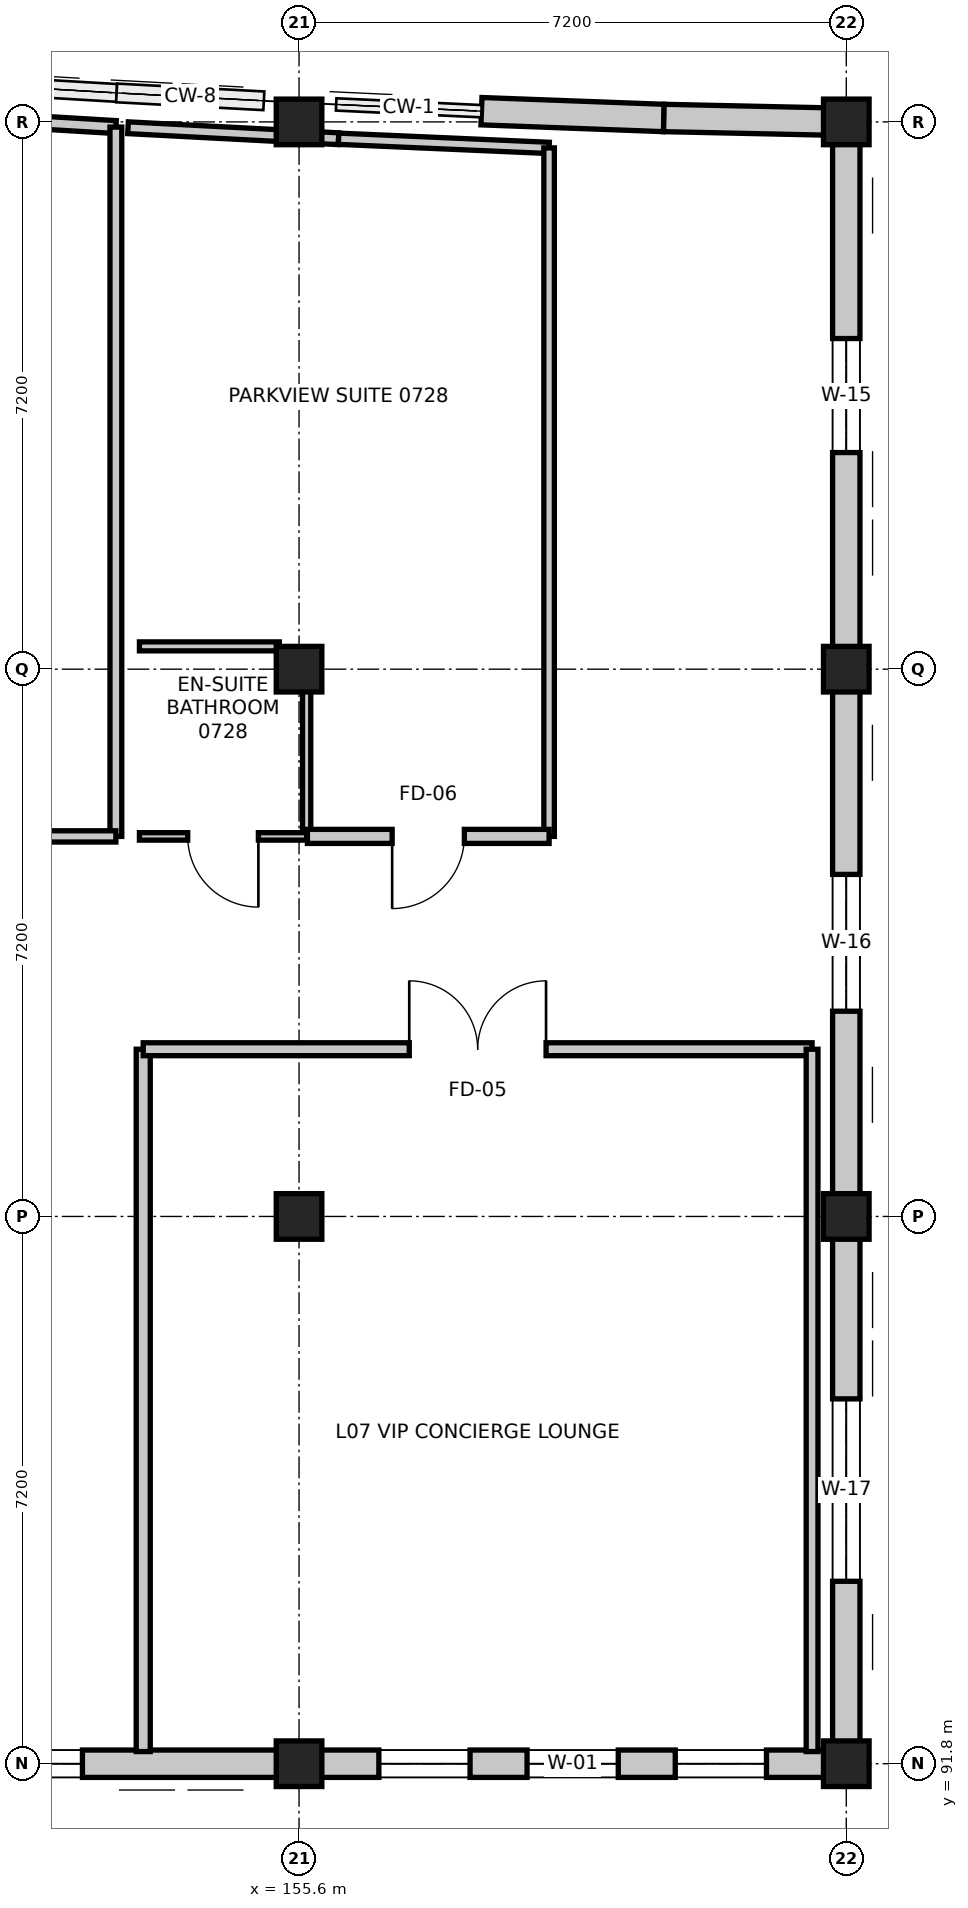
"""IFC4 building model, lengths in metres.
Left out: names, types, materials, properties, quantities, classifications, styles, units other than length and angle.
Written with IfcOpenShell. Run it as: python <this file> out.ifc"""

import sys

from ifc_helpers import new_model, si_unit, direction, frame, frame_2d, origin, origin_2d, place, context, subcontext, project, spatial, rectangle, extrude, element, fill, save


model = new_model("IFC4")
c1 = context("Model", 3, precision=1e-05, world=origin(), true_north=direction((0.0, 1.0)))
c2 = subcontext(c1, "Body", "Model", "MODEL_VIEW")
j1 = project(units=[si_unit("LENGTHUNIT", "METRE"), si_unit("PLANEANGLEUNIT", "RADIAN")], contexts=[c1])
p1 = place(None, origin())
s1 = spatial("IfcSite", under=j1, at=p1, CompositionType="ELEMENT")
p2 = place(p1, origin())
s2 = spatial("IfcBuilding", under=s1, at=p2, CompositionType="ELEMENT")
p3 = place(p2, frame((0.0, 0.0, 30.0)))
s3 = spatial("IfcBuildingStorey", under=s2, at=p3, CompositionType="ELEMENT", Elevation=30.0)
for number, where, z_axis, x_axis in (
    (1, (155.6, 91.8, 0.0), (0.0, 0.0, 1.0), (1.0, 0.0, 0.0)),
    (2, (155.6, 99.0, 0.0), (0.0, 0.0, 1.0), (1.0, 0.0, 0.0)),
    (3, (155.6, 106.2, 0.0), (0.0, 0.0, 1.0), (1.0, 0.0, 0.0)),
    (4, (155.6, 113.4, 0.0), (0.0, 0.0, 1.0), (1.0, 0.0, 0.0)),
    (5, (162.8, 91.8, 0.0), (0.0, 0.0, 1.0), (1.0, 0.0, 0.0)),
    (6, (162.8, 99.0, 0.0), (0.0, 0.0, 1.0), (1.0, 0.0, 0.0)),
    (7, (162.8, 106.2, 0.0), (0.0, 0.0, 1.0), (1.0, 0.0, 0.0)),
    (8, (162.8, 113.4, 0.0), (0.0, 0.0, 1.0), (1.0, 0.0, 0.0)),
):
    element("IfcColumn", number, at=place(p3, frame(where, z_axis=z_axis, x_axis=x_axis)), inside=s3, PredefinedType="COLUMN", context=c2, shape_type="SweptSolid", body=[
        extrude(rectangle(XDim=0.6, YDim=0.6, at=origin_2d()), origin(), (0.0, 0.0, 1.0), 3.6),
    ])
p4 = place(p3, frame((158.0, 113.541, 0.0), z_axis=(0.0, 0.0, 1.0), x_axis=(0.99930757318, -0.037207179225, 0.0)))
e9 = element("IfcWall", 9, at=p4, inside=s3, PredefinedType="STANDARD", context=c2, shape_type="SweptSolid", body=[
    extrude(rectangle(XDim=2.402, YDim=0.36, at=frame_2d((1.201, 0.0))), origin(), (0.0, 0.0, 1.0), 2.86),
])
p5 = place(p3, frame((160.4, 113.452, 0.0), z_axis=(0.0, 0.0, 1.0), x_axis=(0.999767568547, -0.021559426766, 0.0)))
e10 = element("IfcWall", 10, at=p5, inside=s3, PredefinedType="STANDARD", context=c2, shape_type="SweptSolid", body=[
    extrude(rectangle(XDim=2.401, YDim=0.36, at=frame_2d((1.2, 0.0))), origin(), (0.0, 0.0, 1.0), 2.86),
])
p6 = place(p3, frame((162.8, 113.4, 0.0), z_axis=(0.0, 0.0, 1.0), x_axis=(0.0, -1.0, 0.0)))
e11 = element("IfcWall", 11, at=p6, inside=s3, PredefinedType="STANDARD", context=c2, shape_type="SweptSolid", body=[
    extrude(rectangle(XDim=7.2, YDim=0.36, at=frame_2d((3.6, 0.0))), origin(), (0.0, 0.0, 1.0), 2.695),
])
p7 = place(p6, frame((2.85, 0.0, 0.75)))
e12 = element("IfcOpeningElement", 12, at=p7, cuts=e11, PredefinedType="OPENING", context=c2, shape_type="SweptSolid", body=[
    extrude(rectangle(XDim=1.5, YDim=1.5, at=frame_2d((0.75, 0.75))), frame((0.0, 0.19, 0.0), z_axis=(0.0, -1.0, 0.0), x_axis=(1.0, 0.0, 0.0)), (0.0, 0.0, 1.0), 0.38),
])
p8 = place(p3, frame((162.8, 106.2, 0.0), z_axis=(0.0, 0.0, 1.0), x_axis=(0.0, -1.0, 0.0)))
e13 = element("IfcWall", 13, at=p8, inside=s3, PredefinedType="STANDARD", context=c2, shape_type="SweptSolid", body=[
    extrude(rectangle(XDim=7.2, YDim=0.36, at=frame_2d((3.6, 0.0))), origin(), (0.0, 0.0, 1.0), 2.695),
])
p9 = place(p8, frame((2.7, 0.0, 0.75)))
e14 = element("IfcOpeningElement", 14, at=p9, cuts=e13, PredefinedType="OPENING", context=c2, shape_type="SweptSolid", body=[
    extrude(rectangle(XDim=1.8, YDim=1.5, at=frame_2d((0.9, 0.75))), frame((0.0, 0.19, 0.0), z_axis=(0.0, -1.0, 0.0), x_axis=(1.0, 0.0, 0.0)), (0.0, 0.0, 1.0), 0.38),
])
p10 = place(p3, frame((162.8, 99.0, 0.0), z_axis=(0.0, 0.0, 1.0), x_axis=(0.0, -1.0, 0.0)))
e15 = element("IfcWall", 15, at=p10, inside=s3, PredefinedType="STANDARD", context=c2, shape_type="SweptSolid", body=[
    extrude(rectangle(XDim=7.2, YDim=0.36, at=frame_2d((3.6, 0.0))), origin(), (0.0, 0.0, 1.0), 2.695),
])
p11 = place(p10, frame((2.4, 0.0, 0.75)))
e16 = element("IfcOpeningElement", 16, at=p11, cuts=e15, PredefinedType="OPENING", context=c2, shape_type="SweptSolid", body=[
    extrude(rectangle(XDim=2.4, YDim=1.5, at=frame_2d((1.2, 0.75))), frame((0.0, 0.19, 0.0), z_axis=(0.0, -1.0, 0.0), x_axis=(1.0, 0.0, 0.0)), (0.0, 0.0, 1.0), 0.38),
])
p12 = place(p3, frame((162.8, 91.8, 0.0), z_axis=(0.0, 0.0, 1.0), x_axis=(-1.0, 0.0, 0.0)))
e17 = element("IfcWall", 17, at=p12, inside=s3, PredefinedType="STANDARD", context=c2, shape_type="SweptSolid", body=[
    extrude(rectangle(XDim=7.2, YDim=0.36, at=frame_2d((3.6, 0.0))), origin(), (0.0, 0.0, 1.0), 2.86),
])
p13 = place(p12, frame((3.0, 0.0, 0.75)))
e18 = element("IfcOpeningElement", 18, at=p13, cuts=e17, PredefinedType="OPENING", context=c2, shape_type="SweptSolid", body=[
    extrude(rectangle(XDim=1.2, YDim=1.8, at=frame_2d((0.6, 0.9))), frame((0.0, 0.19, 0.0), z_axis=(0.0, -1.0, 0.0), x_axis=(1.0, 0.0, 0.0)), (0.0, 0.0, 1.0), 0.38),
])
p14 = place(p12, frame((1.05, 0.0, 0.85)))
e19 = element("IfcOpeningElement", 19, at=p14, cuts=e17, PredefinedType="OPENING", context=c2, shape_type="SweptSolid", body=[
    extrude(rectangle(XDim=1.2, YDim=1.8, at=frame_2d((0.6, 0.9))), frame((0.0, 0.19, 0.0), z_axis=(0.0, -1.0, 0.0), x_axis=(1.0, 0.0, 0.0)), (0.0, 0.0, 1.0), 0.38),
])
p15 = place(p12, frame((4.95, 0.0, 0.85)))
e20 = element("IfcOpeningElement", 20, at=p15, cuts=e17, PredefinedType="OPENING", context=c2, shape_type="SweptSolid", body=[
    extrude(rectangle(XDim=1.2, YDim=1.8, at=frame_2d((0.6, 0.9))), frame((0.0, 0.19, 0.0), z_axis=(0.0, -1.0, 0.0), x_axis=(1.0, 0.0, 0.0)), (0.0, 0.0, 1.0), 0.38),
])
p16 = place(p3, frame((155.6, 91.8, 0.0), z_axis=(0.0, 0.0, 1.0), x_axis=(-1.0, 0.0, 0.0)))
e21 = element("IfcWall", 21, at=p16, inside=s3, PredefinedType="STANDARD", context=c2, shape_type="SweptSolid", body=[
    extrude(rectangle(XDim=7.2, YDim=0.36, at=frame_2d((3.6, 0.0))), origin(), (0.0, 0.0, 1.0), 2.745),
])
p17 = place(p16, frame((2.85, 0.0, 0.75)))
e22 = element("IfcOpeningElement", 22, at=p17, cuts=e21, PredefinedType="OPENING", context=c2, shape_type="SweptSolid", body=[
    extrude(rectangle(XDim=1.5, YDim=1.5, at=frame_2d((0.75, 0.75))), frame((0.0, 0.19, 0.0), z_axis=(0.0, -1.0, 0.0), x_axis=(1.0, 0.0, 0.0)), (0.0, 0.0, 1.0), 0.38),
])
p18 = place(p16, frame((4.899, 0.0, 0.85)))
e23 = element("IfcOpeningElement", 23, at=p18, cuts=e21, PredefinedType="OPENING", context=c2, shape_type="SweptSolid", body=[
    extrude(rectangle(XDim=1.2, YDim=1.8, at=frame_2d((0.6, 0.9))), frame((0.0, 0.19, 0.0), z_axis=(0.0, -1.0, 0.0), x_axis=(1.0, 0.0, 0.0)), (0.0, 0.0, 1.0), 0.38),
])
p19 = place(p3, frame((153.55, 91.96, 0.0), z_axis=(0.0, 0.0, 1.0), x_axis=(0.0, 1.0, 0.0)))
e24 = element("IfcWall", 24, at=p19, inside=s3, PredefinedType="PARTITIONING", context=c2, shape_type="SweptSolid", body=[
    extrude(rectangle(XDim=9.24, YDim=0.185, at=frame_2d((4.62, 0.0))), origin(), (0.0, 0.0, 1.0), 2.745),
])
p20 = place(p3, frame((153.55, 101.2, 0.0), z_axis=(0.0, 0.0, 1.0), x_axis=(1.0, 0.0, 0.0)))
e25 = element("IfcWall", 25, at=p20, inside=s3, PredefinedType="PARTITIONING", context=c2, shape_type="SweptSolid", body=[
    extrude(rectangle(XDim=8.8, YDim=0.17, at=frame_2d((4.4, 0.0))), origin(), (0.0, 0.0, 1.0), 2.695),
])
p21 = place(p20, frame((3.5, 0.0, 0.0)))
e26 = element("IfcOpeningElement", 26, at=p21, cuts=e25, PredefinedType="OPENING", context=c2, shape_type="SweptSolid", body=[
    extrude(rectangle(XDim=1.8, YDim=2.2, at=frame_2d((0.9, 1.1))), frame((0.0, 0.095, 0.0), z_axis=(0.0, -1.0, 0.0), x_axis=(1.0, 0.0, 0.0)), (0.0, 0.0, 1.0), 0.19),
])
p22 = place(p3, frame((162.35, 101.2, 0.0), z_axis=(0.0, 0.0, 1.0), x_axis=(0.0, -1.0, 0.0)))
e27 = element("IfcWall", 27, at=p22, inside=s3, PredefinedType="PARTITIONING", context=c2, shape_type="SweptSolid", body=[
    extrude(rectangle(XDim=9.24, YDim=0.155, at=frame_2d((4.62, 0.0))), origin(), (0.0, 0.0, 1.0), 2.86),
])
p23 = place(p3, frame((150.42, 113.497, 0.0), z_axis=(0.0, 0.0, 1.0), x_axis=(0.998224568203, -0.059562668136, 0.0)))
e28 = element("IfcWall", 28, at=p23, inside=s3, PredefinedType="PARTITIONING", context=c2, shape_type="SweptSolid", body=[
    extrude(rectangle(XDim=2.775, YDim=0.17, at=frame_2d((1.387, 0.0))), origin(), (0.0, 0.0, 1.0), 2.745),
])
p24 = place(p3, frame((153.19, 113.332, 0.0), z_axis=(0.0, 0.0, 1.0), x_axis=(0.0, -1.0, 0.0)))
e29 = element("IfcWall", 29, at=p24, inside=s3, PredefinedType="PARTITIONING", context=c2, shape_type="SweptSolid", body=[
    extrude(rectangle(XDim=9.332, YDim=0.155, at=frame_2d((4.666, 0.0))), origin(), (0.0, 0.0, 1.0), 2.745),
])
p25 = place(p3, frame((153.19, 104.0, 0.0), z_axis=(0.0, 0.0, 1.0), x_axis=(-1.0, 0.0, 0.0)))
e30 = element("IfcWall", 30, at=p25, inside=s3, PredefinedType="PARTITIONING", context=c2, shape_type="SweptSolid", body=[
    extrude(rectangle(XDim=3.18, YDim=0.148, at=frame_2d((1.59, 0.0))), origin(), (0.0, 0.0, 1.0), 3.36),
])
p26 = place(p25, frame((1.06, 0.0, 0.0)))
e31 = element("IfcOpeningElement", 31, at=p26, cuts=e30, PredefinedType="OPENING", context=c2, shape_type="SweptSolid", body=[
    extrude(rectangle(XDim=1.06, YDim=2.2, at=frame_2d((0.53, 1.1))), frame((0.0, 0.084, 0.0), z_axis=(0.0, -1.0, 0.0), x_axis=(1.0, 0.0, 0.0)), (0.0, 0.0, 1.0), 0.168),
])
p27 = place(p3, frame((153.5, 106.5, 0.0), z_axis=(0.0, 0.0, 1.0), x_axis=(1.0, 0.0, 0.0)))
e32 = element("IfcWall", 32, at=p27, inside=s3, PredefinedType="PARTITIONING", context=c2, shape_type="SweptSolid", body=[
    extrude(rectangle(XDim=1.84, YDim=0.118, at=frame_2d((0.92, 0.0))), origin(), (0.0, 0.0, 1.0), 3.36),
])
p28 = place(p3, frame((155.7, 106.14, 0.0), z_axis=(0.0, 0.0, 1.0), x_axis=(0.0, -1.0, 0.0)))
e33 = element("IfcWall", 33, at=p28, inside=s3, PredefinedType="PARTITIONING", context=c2, shape_type="SweptSolid", body=[
    extrude(rectangle(XDim=2.14, YDim=0.108, at=frame_2d((1.07, 0.0))), origin(), (0.0, 0.0, 1.0), 2.695),
])
p29 = place(p3, frame((155.7, 104.0, 0.0), z_axis=(0.0, 0.0, 1.0), x_axis=(-1.0, 0.0, 0.0)))
e34 = element("IfcWall", 34, at=p29, inside=s3, PredefinedType="PARTITIONING", context=c2, shape_type="SweptSolid", body=[
    extrude(rectangle(XDim=2.2, YDim=0.098, at=frame_2d((1.1, 0.0))), origin(), (0.0, 0.0, 1.0), 2.695),
])
p30 = place(p29, frame((0.635, 0.0, 0.0)))
e35 = element("IfcOpeningElement", 35, at=p30, cuts=e34, PredefinedType="OPENING", context=c2, shape_type="SweptSolid", body=[
    extrude(rectangle(XDim=0.93, YDim=2.13, at=frame_2d((0.465, 1.065))), frame((0.0, 0.059, 0.0), z_axis=(0.0, -1.0, 0.0), x_axis=(1.0, 0.0, 0.0)), (0.0, 0.0, 1.0), 0.118),
])
p31 = place(p3, frame((153.35, 113.323, 0.0), z_axis=(0.0, 0.0, 1.0), x_axis=(0.9986369707, -0.052193876575, 0.0)))
e36 = element("IfcWall", 36, at=p31, inside=s3, PredefinedType="PARTITIONING", context=c2, shape_type="SweptSolid", body=[
    extrude(rectangle(XDim=2.774, YDim=0.155, at=frame_2d((1.387, 0.0))), origin(), (0.0, 0.0, 1.0), 2.695),
])
p32 = place(p3, frame((156.12, 113.178, 0.0), z_axis=(0.0, 0.0, 1.0), x_axis=(0.999053331641, -0.043502190025, 0.0)))
e37 = element("IfcWall", 37, at=p32, inside=s3, PredefinedType="PARTITIONING", context=c2, shape_type="SweptSolid", body=[
    extrude(rectangle(XDim=2.772, YDim=0.148, at=frame_2d((1.386, 0.0))), origin(), (0.0, 0.0, 1.0), 3.36),
])
p33 = place(p3, frame((158.89, 113.058, 0.0), z_axis=(0.0, 0.0, 1.0), x_axis=(0.0, -1.0, 0.0)))
e38 = element("IfcWall", 38, at=p33, inside=s3, PredefinedType="PARTITIONING", context=c2, shape_type="SweptSolid", body=[
    extrude(rectangle(XDim=9.058, YDim=0.138, at=frame_2d((4.529, 0.0))), origin(), (0.0, 0.0, 1.0), 2.86),
])
p34 = place(p3, frame((158.89, 104.0, 0.0), z_axis=(0.0, 0.0, 1.0), x_axis=(-1.0, 0.0, 0.0)))
e39 = element("IfcWall", 39, at=p34, inside=s3, PredefinedType="PARTITIONING", context=c2, shape_type="SweptSolid", body=[
    extrude(rectangle(XDim=3.18, YDim=0.185, at=frame_2d((1.59, 0.0))), origin(), (0.0, 0.0, 1.0), 2.695),
])
p35 = place(p34, frame((1.115, 0.0, 0.0)))
e40 = element("IfcOpeningElement", 40, at=p35, cuts=e39, PredefinedType="OPENING", context=c2, shape_type="SweptSolid", body=[
    extrude(rectangle(XDim=0.95, YDim=2.1, at=frame_2d((0.475, 1.05))), frame((0.0, 0.103, 0.0), z_axis=(0.0, -1.0, 0.0), x_axis=(1.0, 0.0, 0.0)), (0.0, 0.0, 1.0), 0.205),
])
p36 = place(p7, origin())
e41 = element("IfcWindow", 41, at=p36, inside=s3, PartitioningType="SINGLE_PANEL", PredefinedType="WINDOW", context=c2, shape_type="SweptSolid", body=[
    extrude(rectangle(XDim=1.5, YDim=1.5, at=frame_2d((0.75, 0.75))), frame((0.0, 0.03, 0.0), z_axis=(0.0, -1.0, 0.0), x_axis=(1.0, 0.0, 0.0)), (0.0, 0.0, 1.0), 0.06),
])
fill(e12, e41)
p37 = place(p9, origin())
e42 = element("IfcWindow", 42, at=p37, inside=s3, PartitioningType="SINGLE_PANEL", PredefinedType="WINDOW", context=c2, shape_type="SweptSolid", body=[
    extrude(rectangle(XDim=1.8, YDim=1.5, at=frame_2d((0.9, 0.75))), frame((0.0, 0.03, 0.0), z_axis=(0.0, -1.0, 0.0), x_axis=(1.0, 0.0, 0.0)), (0.0, 0.0, 1.0), 0.06),
])
fill(e14, e42)
p38 = place(p11, origin())
e43 = element("IfcWindow", 43, at=p38, inside=s3, PartitioningType="SINGLE_PANEL", PredefinedType="WINDOW", context=c2, shape_type="SweptSolid", body=[
    extrude(rectangle(XDim=2.4, YDim=1.5, at=frame_2d((1.2, 0.75))), frame((0.0, 0.03, 0.0), z_axis=(0.0, -1.0, 0.0), x_axis=(1.0, 0.0, 0.0)), (0.0, 0.0, 1.0), 0.06),
])
fill(e16, e43)
p39 = place(p13, origin())
e44 = element("IfcWindow", 44, at=p39, inside=s3, PartitioningType="SINGLE_PANEL", PredefinedType="WINDOW", context=c2, shape_type="SweptSolid", body=[
    extrude(rectangle(XDim=1.2, YDim=1.8, at=frame_2d((0.6, 0.9))), frame((0.0, 0.03, 0.0), z_axis=(0.0, -1.0, 0.0), x_axis=(1.0, 0.0, 0.0)), (0.0, 0.0, 1.0), 0.06),
])
fill(e18, e44)
p40 = place(p14, origin())
e45 = element("IfcWindow", 45, at=p40, inside=s3, PartitioningType="SINGLE_PANEL", PredefinedType="WINDOW", context=c2, shape_type="SweptSolid", body=[
    extrude(rectangle(XDim=1.2, YDim=1.8, at=frame_2d((0.6, 0.9))), frame((0.0, 0.03, 0.0), z_axis=(0.0, -1.0, 0.0), x_axis=(1.0, 0.0, 0.0)), (0.0, 0.0, 1.0), 0.06),
])
fill(e19, e45)
p41 = place(p15, origin())
e46 = element("IfcWindow", 46, at=p41, inside=s3, PartitioningType="SINGLE_PANEL", PredefinedType="WINDOW", context=c2, shape_type="SweptSolid", body=[
    extrude(rectangle(XDim=1.2, YDim=1.8, at=frame_2d((0.6, 0.9))), frame((0.0, 0.03, 0.0), z_axis=(0.0, -1.0, 0.0), x_axis=(1.0, 0.0, 0.0)), (0.0, 0.0, 1.0), 0.06),
])
fill(e20, e46)
p42 = place(p17, origin())
e47 = element("IfcWindow", 47, at=p42, inside=s3, PartitioningType="SINGLE_PANEL", PredefinedType="WINDOW", context=c2, shape_type="SweptSolid", body=[
    extrude(rectangle(XDim=1.5, YDim=1.5, at=frame_2d((0.75, 0.75))), frame((0.0, 0.03, 0.0), z_axis=(0.0, -1.0, 0.0), x_axis=(1.0, 0.0, 0.0)), (0.0, 0.0, 1.0), 0.06),
])
fill(e22, e47)
p43 = place(p21, origin())
e48 = element("IfcDoor", 48, at=p43, inside=s3, OperationType="DOUBLE_DOOR_SINGLE_SWING", PredefinedType="DOOR", context=c2, shape_type="SweptSolid", body=[
    extrude(rectangle(XDim=1.8, YDim=2.2, at=frame_2d((0.9, 1.1))), frame((0.0, 0.025, 0.0), z_axis=(0.0, -1.0, 0.0), x_axis=(1.0, 0.0, 0.0)), (0.0, 0.0, 1.0), 0.05),
])
fill(e26, e48)
p44 = place(p30, origin())
e49 = element("IfcDoor", 49, at=p44, inside=s3, OperationType="SINGLE_SWING_LEFT", PredefinedType="DOOR", context=c2, shape_type="SweptSolid", body=[
    extrude(rectangle(XDim=0.93, YDim=2.13, at=frame_2d((0.465, 1.065))), frame((0.0, 0.025, 0.0), z_axis=(0.0, -1.0, 0.0), x_axis=(1.0, 0.0, 0.0)), (0.0, 0.0, 1.0), 0.05),
])
fill(e35, e49)
p45 = place(p35, origin())
e50 = element("IfcDoor", 50, at=p45, inside=s3, OperationType="SINGLE_SWING_RIGHT", PredefinedType="DOOR", context=c2, shape_type="SweptSolid", body=[
    extrude(rectangle(XDim=0.95, YDim=2.1, at=frame_2d((0.475, 1.05))), frame((0.0, 0.025, 0.0), z_axis=(0.0, -1.0, 0.0), x_axis=(1.0, 0.0, 0.0)), (0.0, 0.0, 1.0), 0.05),
])
fill(e40, e50)
save(model, sys.argv[1])
